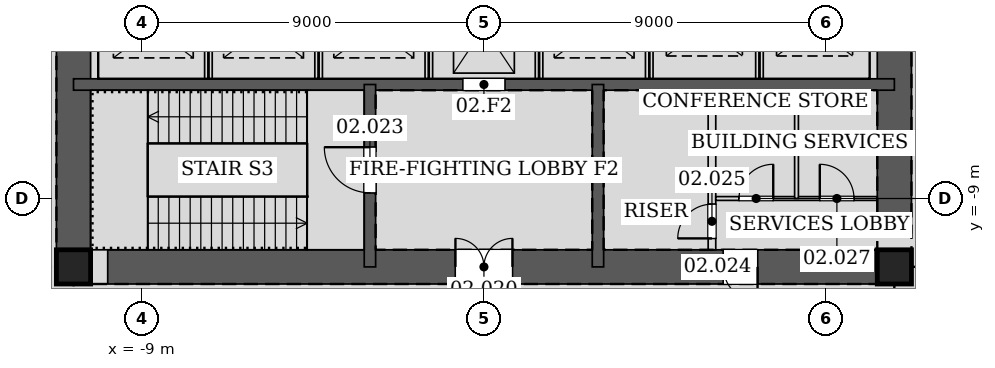
"""IFC4 building model, lengths in metres.
Left out: names, types, materials, properties, quantities, classifications, styles, units other than length and angle.
Written with IfcOpenShell. Run it as: python <this file> out.ifc"""

import sys

from ifc_helpers import new_model, si_unit, direction, frame, frame_2d, origin, origin_2d, place, context, subcontext, project, spatial, rectangle, hollow_rectangle, extrude, element, fill, save


model = new_model("IFC4")
c1 = context("Model", 3, precision=1e-05, world=origin(), true_north=direction((0.0, 1.0)))
c2 = subcontext(c1, "Body", "Model", "MODEL_VIEW")
j1 = project(units=[si_unit("LENGTHUNIT", "METRE"), si_unit("PLANEANGLEUNIT", "RADIAN")], contexts=[c1])
p1 = place(None, origin())
s1 = spatial("IfcSite", under=j1, at=p1, CompositionType="ELEMENT")
p2 = place(p1, origin())
s2 = spatial("IfcBuilding", under=s1, at=p2, CompositionType="ELEMENT")
p3 = place(p2, frame((0.0, 0.0, 13.2)))
s3 = spatial("IfcBuildingStorey", under=s2, at=p3, CompositionType="ELEMENT", Elevation=13.2)
for number, where, z_axis, x_axis in (
    (1, (-10.8, -10.8, 0.0), (0.0, 0.0, 1.0), (1.0, 0.0, 0.0)),
    (2, (10.8, -10.8, 0.0), (0.0, 0.0, 1.0), (1.0, 0.0, 0.0)),
):
    element("IfcColumn", number, at=place(p3, frame(where, z_axis=z_axis, x_axis=x_axis)), inside=s3, PredefinedType="COLUMN", context=c2, shape_type="SweptSolid", body=[
        extrude(hollow_rectangle(XDim=0.9, YDim=0.9, WallThickness=0.06, at=origin_2d()), origin(), (0.0, 0.0, 1.0), 5.4),
    ])
p4 = place(p3, frame((-10.8, -10.8, 0.0), z_axis=(0.0, 0.0, 1.0), x_axis=(1.0, 0.0, 0.0)))
e3 = element("IfcWall", 3, at=p4, inside=s3, PredefinedType="SOLIDWALL", context=c2, shape_type="SweptSolid", body=[
    extrude(rectangle(XDim=21.6, YDim=0.9, at=frame_2d((10.8, 0.0))), origin(), (0.0, 0.0, 1.0), 5.4),
])
p5 = place(p4, frame((10.05, 0.0, 0.0)))
e4 = element("IfcOpeningElement", 4, at=p5, cuts=e3, PredefinedType="OPENING", context=c2, shape_type="SweptSolid", body=[
    extrude(rectangle(XDim=1.5, YDim=2.1, at=frame_2d((0.75, 1.05))), frame((0.0, 0.46, 0.0), z_axis=(0.0, -1.0, 0.0), x_axis=(1.0, 0.0, 0.0)), (0.0, 0.0, 1.0), 0.92),
])
p6 = place(p4, frame((17.1, 0.0, 0.0)))
e5 = element("IfcOpeningElement", 5, at=p6, cuts=e3, PredefinedType="OPENING", context=c2, shape_type="SweptSolid", body=[
    extrude(rectangle(XDim=0.9, YDim=2.1, at=frame_2d((0.45, 1.05))), frame((0.0, 0.46, 0.0), z_axis=(0.0, -1.0, 0.0), x_axis=(1.0, 0.0, 0.0)), (0.0, 0.0, 1.0), 0.92),
])
p7 = place(p3, frame((10.8, -10.8, 0.0), z_axis=(0.0, 0.0, 1.0), x_axis=(0.0, 1.0, 0.0)))
e6 = element("IfcWall", 6, at=p7, inside=s3, PredefinedType="SOLIDWALL", context=c2, shape_type="SweptSolid", body=[
    extrude(rectangle(XDim=21.6, YDim=0.9, at=frame_2d((10.8, 0.0))), origin(), (0.0, 0.0, 1.0), 5.4),
])
p8 = place(p7, frame((11.7, 0.0, 0.0)))
e7 = element("IfcOpeningElement", 7, at=p8, cuts=e6, PredefinedType="OPENING", context=c2, shape_type="SweptSolid", body=[
    extrude(rectangle(XDim=1.2, YDim=2.1, at=frame_2d((0.6, 1.05))), frame((0.0, 0.46, 0.0), z_axis=(0.0, -1.0, 0.0), x_axis=(1.0, 0.0, 0.0)), (0.0, 0.0, 1.0), 0.92),
])
p9 = place(p7, frame((8.7, 0.0, 0.0)))
e8 = element("IfcOpeningElement", 8, at=p9, cuts=e6, PredefinedType="OPENING", context=c2, shape_type="SweptSolid", body=[
    extrude(rectangle(XDim=1.2, YDim=2.1, at=frame_2d((0.6, 1.05))), frame((0.0, 0.46, 0.0), z_axis=(0.0, -1.0, 0.0), x_axis=(1.0, 0.0, 0.0)), (0.0, 0.0, 1.0), 0.92),
])
p10 = place(p3, frame((-10.8, 10.8, 0.0), z_axis=(0.0, 0.0, 1.0), x_axis=(0.0, -1.0, 0.0)))
e9 = element("IfcWall", 9, at=p10, inside=s3, PredefinedType="SOLIDWALL", context=c2, shape_type="SweptSolid", body=[
    extrude(rectangle(XDim=21.6, YDim=0.9, at=frame_2d((10.8, 0.0))), origin(), (0.0, 0.0, 1.0), 5.4),
])
p11 = place(p10, frame((8.7, 0.0, 0.0)))
e10 = element("IfcOpeningElement", 10, at=p11, cuts=e9, PredefinedType="OPENING", context=c2, shape_type="SweptSolid", body=[
    extrude(rectangle(XDim=1.2, YDim=2.1, at=frame_2d((0.6, 1.05))), frame((0.0, 0.46, 0.0), z_axis=(0.0, -1.0, 0.0), x_axis=(1.0, 0.0, 0.0)), (0.0, 0.0, 1.0), 0.92),
])
p12 = place(p10, frame((11.7, 0.0, 0.0)))
e11 = element("IfcOpeningElement", 11, at=p12, cuts=e9, PredefinedType="OPENING", context=c2, shape_type="SweptSolid", body=[
    extrude(rectangle(XDim=1.2, YDim=2.1, at=frame_2d((0.6, 1.05))), frame((0.0, 0.46, 0.0), z_axis=(0.0, -1.0, 0.0), x_axis=(1.0, 0.0, 0.0)), (0.0, 0.0, 1.0), 0.92),
])
p13 = place(p3, frame((-10.8, -6.0, 0.0), z_axis=(0.0, 0.0, 1.0), x_axis=(1.0, 0.0, 0.0)))
e12 = element("IfcWall", 12, at=p13, inside=s3, PredefinedType="SOLIDWALL", context=c2, shape_type="SweptSolid", body=[
    extrude(rectangle(XDim=21.6, YDim=0.3, at=frame_2d((10.8, 0.0))), origin(), (0.0, 0.0, 1.0), 5.4),
])
p14 = place(p13, frame((10.25, 0.0, 0.0)))
e13 = element("IfcOpeningElement", 13, at=p14, cuts=e12, PredefinedType="OPENING", context=c2, shape_type="SweptSolid", body=[
    extrude(rectangle(XDim=1.1, YDim=2.1, at=frame_2d((0.55, 1.05))), frame((0.0, 0.16, 0.0), z_axis=(0.0, -1.0, 0.0), x_axis=(1.0, 0.0, 0.0)), (0.0, 0.0, 1.0), 0.32),
])
p15 = place(p3, frame((-3.0, -6.0, 0.0), z_axis=(0.0, 0.0, 1.0), x_axis=(0.0, -1.0, 0.0)))
e14 = element("IfcWall", 14, at=p15, inside=s3, PredefinedType="SOLIDWALL", context=c2, shape_type="SweptSolid", body=[
    extrude(rectangle(XDim=4.8, YDim=0.3, at=frame_2d((2.4, 0.0))), origin(), (0.0, 0.0, 1.0), 5.4),
])
p16 = place(p15, frame((1.65, 0.0, 0.0)))
e15 = element("IfcOpeningElement", 15, at=p16, cuts=e14, PredefinedType="OPENING", context=c2, shape_type="SweptSolid", body=[
    extrude(rectangle(XDim=1.2, YDim=2.1, at=frame_2d((0.6, 1.05))), frame((0.0, 0.16, 0.0), z_axis=(0.0, -1.0, 0.0), x_axis=(1.0, 0.0, 0.0)), (0.0, 0.0, 1.0), 0.32),
])
p17 = place(p3, frame((3.0, -6.0, 0.0), z_axis=(0.0, 0.0, 1.0), x_axis=(0.0, -1.0, 0.0)))
e16 = element("IfcWall", 16, at=p17, inside=s3, PredefinedType="SOLIDWALL", context=c2, shape_type="SweptSolid", body=[
    extrude(rectangle(XDim=4.8, YDim=0.3, at=frame_2d((2.4, 0.0))), origin(), (0.0, 0.0, 1.0), 5.4),
])
for number, where, z_axis, x_axis in (
    (17, (-7.25, -5.85, 0.0), (0.0, 0.0, 1.0), (0.0, 1.0, 0.0)),
    (18, (-4.35, -5.85, 0.0), (0.0, 0.0, 1.0), (0.0, 1.0, 0.0)),
    (19, (-1.45, -5.85, 0.0), (0.0, 0.0, 1.0), (0.0, 1.0, 0.0)),
    (20, (1.45, -5.85, 0.0), (0.0, 0.0, 1.0), (0.0, 1.0, 0.0)),
    (21, (4.35, -5.85, 0.0), (0.0, 0.0, 1.0), (0.0, 1.0, 0.0)),
    (22, (7.25, -5.85, 0.0), (0.0, 0.0, 1.0), (0.0, 1.0, 0.0)),
):
    element("IfcWall", number, at=place(p3, frame(where, z_axis=z_axis, x_axis=x_axis)), inside=s3, PredefinedType="PARTITIONING", context=c2, shape_type="SweptSolid", body=[
        extrude(rectangle(XDim=2.7, YDim=0.2, at=frame_2d((1.35, 0.0))), origin(), (0.0, 0.0, 1.0), 5.4),
    ])
p18 = place(p3, frame((6.0, -10.35, 0.0), z_axis=(0.0, 0.0, 1.0), x_axis=(0.0, 1.0, 0.0)))
e23 = element("IfcWall", 23, at=p18, inside=s3, PredefinedType="PARTITIONING", context=c2, shape_type="SweptSolid", body=[
    extrude(rectangle(XDim=4.2, YDim=0.2, at=frame_2d((2.1, 0.0))), origin(), (0.0, 0.0, 1.0), 5.1),
])
p19 = place(p18, frame((0.3, 0.0, 0.0)))
e24 = element("IfcOpeningElement", 24, at=p19, cuts=e23, PredefinedType="OPENING", context=c2, shape_type="SweptSolid", body=[
    extrude(rectangle(XDim=0.9, YDim=2.1, at=frame_2d((0.45, 1.05))), frame((0.0, 0.11, 0.0), z_axis=(0.0, -1.0, 0.0), x_axis=(1.0, 0.0, 0.0)), (0.0, 0.0, 1.0), 0.22),
])
p20 = place(p3, frame((6.1, -9.0, 0.0), z_axis=(0.0, 0.0, 1.0), x_axis=(1.0, 0.0, 0.0)))
e25 = element("IfcWall", 25, at=p20, inside=s3, PredefinedType="PARTITIONING", context=c2, shape_type="SweptSolid", body=[
    extrude(rectangle(XDim=4.25, YDim=0.1, at=frame_2d((2.125, 0.0))), origin(), (0.0, 0.0, 1.0), 5.1),
])
p21 = place(p20, frame((0.613, 0.0, 0.0)))
e26 = element("IfcOpeningElement", 26, at=p21, cuts=e25, PredefinedType="OPENING", context=c2, shape_type="SweptSolid", body=[
    extrude(rectangle(XDim=0.9, YDim=2.1, at=frame_2d((0.45, 1.05))), frame((0.0, 0.06, 0.0), z_axis=(0.0, -1.0, 0.0), x_axis=(1.0, 0.0, 0.0)), (0.0, 0.0, 1.0), 0.12),
])
p22 = place(p20, frame((2.738, 0.0, 0.0)))
e27 = element("IfcOpeningElement", 27, at=p22, cuts=e25, PredefinedType="OPENING", context=c2, shape_type="SweptSolid", body=[
    extrude(rectangle(XDim=0.9, YDim=2.1, at=frame_2d((0.45, 1.05))), frame((0.0, 0.06, 0.0), z_axis=(0.0, -1.0, 0.0), x_axis=(1.0, 0.0, 0.0)), (0.0, 0.0, 1.0), 0.12),
])
p23 = place(p3, frame((8.225, -9.0, 0.0), z_axis=(0.0, 0.0, 1.0), x_axis=(0.0, 1.0, 0.0)))
e28 = element("IfcWall", 28, at=p23, inside=s3, PredefinedType="PARTITIONING", context=c2, shape_type="SweptSolid", body=[
    extrude(rectangle(XDim=2.85, YDim=0.1, at=frame_2d((1.425, 0.0))), origin(), (0.0, 0.0, 1.0), 5.1),
])
p24 = place(p5, origin())
e29 = element("IfcDoor", 29, at=p24, inside=s3, OperationType="DOUBLE_DOOR_SINGLE_SWING", PredefinedType="DOOR", context=c2, shape_type="SweptSolid", body=[
    extrude(rectangle(XDim=1.5, YDim=2.1, at=frame_2d((0.75, 1.05))), frame((0.0, 0.025, 0.0), z_axis=(0.0, -1.0, 0.0), x_axis=(1.0, 0.0, 0.0)), (0.0, 0.0, 1.0), 0.05),
])
fill(e4, e29)
p25 = place(p16, frame((1.2, 0.0, 0.0), z_axis=(0.0, 0.0, 1.0), x_axis=(-1.0, 0.0, 0.0)))
e30 = element("IfcDoor", 30, at=p25, inside=s3, OperationType="SINGLE_SWING_RIGHT", PredefinedType="DOOR", context=c2, shape_type="SweptSolid", body=[
    extrude(rectangle(XDim=1.2, YDim=2.1, at=frame_2d((0.6, 1.05))), frame((0.0, 0.025, 0.0), z_axis=(0.0, -1.0, 0.0), x_axis=(1.0, 0.0, 0.0)), (0.0, 0.0, 1.0), 0.05),
])
fill(e15, e30)
p26 = place(p6, frame((0.9, 0.0, 0.0), z_axis=(0.0, 0.0, 1.0), x_axis=(-1.0, 0.0, 0.0)))
e31 = element("IfcDoor", 31, at=p26, inside=s3, OperationType="SINGLE_SWING_LEFT", PredefinedType="DOOR", context=c2, shape_type="SweptSolid", body=[
    extrude(rectangle(XDim=0.9, YDim=2.1, at=frame_2d((0.45, 1.05))), frame((0.0, 0.025, 0.0), z_axis=(0.0, -1.0, 0.0), x_axis=(1.0, 0.0, 0.0)), (0.0, 0.0, 1.0), 0.05),
])
fill(e5, e31)
p27 = place(p19, origin())
e32 = element("IfcDoor", 32, at=p27, inside=s3, OperationType="SINGLE_SWING_LEFT", PredefinedType="DOOR", context=c2, shape_type="SweptSolid", body=[
    extrude(rectangle(XDim=0.9, YDim=2.1, at=frame_2d((0.45, 1.05))), frame((0.0, 0.025, 0.0), z_axis=(0.0, -1.0, 0.0), x_axis=(1.0, 0.0, 0.0)), (0.0, 0.0, 1.0), 0.05),
])
fill(e24, e32)
p28 = place(p21, origin())
e33 = element("IfcDoor", 33, at=p28, inside=s3, OperationType="SINGLE_SWING_RIGHT", PredefinedType="DOOR", context=c2, shape_type="SweptSolid", body=[
    extrude(rectangle(XDim=0.9, YDim=2.1, at=frame_2d((0.45, 1.05))), frame((0.0, 0.025, 0.0), z_axis=(0.0, -1.0, 0.0), x_axis=(1.0, 0.0, 0.0)), (0.0, 0.0, 1.0), 0.05),
])
fill(e26, e33)
p29 = place(p22, origin())
e34 = element("IfcDoor", 34, at=p29, inside=s3, OperationType="SINGLE_SWING_LEFT", PredefinedType="DOOR", context=c2, shape_type="SweptSolid", body=[
    extrude(rectangle(XDim=0.9, YDim=2.1, at=frame_2d((0.45, 1.05))), frame((0.0, 0.025, 0.0), z_axis=(0.0, -1.0, 0.0), x_axis=(1.0, 0.0, 0.0)), (0.0, 0.0, 1.0), 0.05),
])
fill(e27, e34)
p30 = place(p14, origin())
e35 = element("IfcDoor", 35, at=p30, inside=s3, OperationType="DOUBLE_DOOR_SLIDING", PredefinedType="DOOR", context=c2, shape_type="SweptSolid", body=[
    extrude(rectangle(XDim=1.1, YDim=2.1, at=frame_2d((0.55, 1.05))), frame((0.0, 0.025, 0.0), z_axis=(0.0, -1.0, 0.0), x_axis=(1.0, 0.0, 0.0)), (0.0, 0.0, 1.0), 0.05),
])
fill(e13, e35)
save(model, sys.argv[1])
